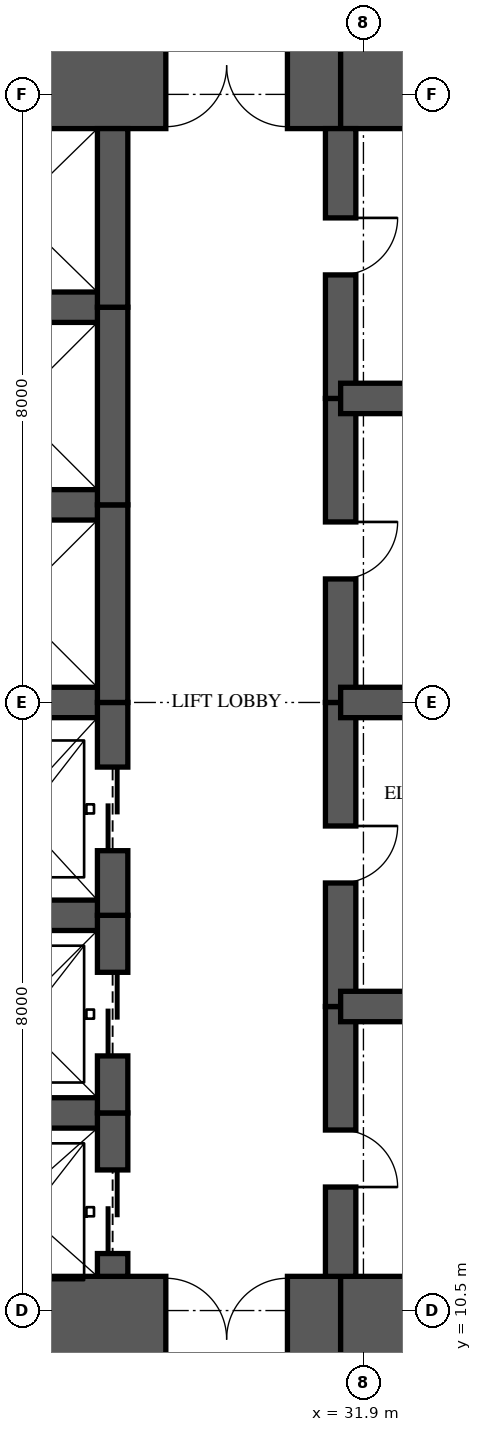
"""IFC4 building model, lengths in metres.
Left out: names, types, materials, properties, quantities, classifications, styles, units other than length and angle.
Written with IfcOpenShell. Run it as: python <this file> out.ifc"""

import sys

from ifc_helpers import new_model, si_unit, direction, frame, frame_2d, origin, place, context, subcontext, project, spatial, rectangle, extrude, element, fill, save


model = new_model("IFC4")
c1 = context("Model", 3, precision=1e-05, world=origin(), true_north=direction((0.0, 1.0)))
c2 = subcontext(c1, "Body", "Model", "MODEL_VIEW")
j1 = project(units=[si_unit("LENGTHUNIT", "METRE"), si_unit("PLANEANGLEUNIT", "RADIAN")], contexts=[c1])
p1 = place(None, origin())
s1 = spatial("IfcSite", under=j1, at=p1, CompositionType="ELEMENT")
p2 = place(p1, origin())
s2 = spatial("IfcBuilding", under=s1, at=p2, CompositionType="ELEMENT")
p3 = place(p2, frame((0.0, 0.0, 24.35)))
s3 = spatial("IfcBuildingStorey", under=s2, at=p3, CompositionType="ELEMENT", Elevation=24.35)
p4 = place(p3, frame((26.0, 10.125, 0.0), z_axis=(0.0, 0.0, 1.0), x_axis=(1.0, 0.0, 0.0)))
e1 = element("IfcWall", 1, at=p4, inside=s3, PredefinedType="SHEAR", context=c2, shape_type="SweptSolid", body=[
    extrude(rectangle(XDim=5.6, YDim=1.65, at=frame_2d((2.8, 0.0))), origin(), (0.0, 0.0, 1.0), 3.35),
])
p5 = place(p4, frame((3.3, 0.0, 0.0)))
e2 = element("IfcOpeningElement", 2, at=p5, cuts=e1, PredefinedType="OPENING", context=c2, shape_type="SweptSolid", body=[
    extrude(rectangle(XDim=1.6, YDim=2.1, at=frame_2d((0.8, 1.05))), frame((0.0, 0.835, 0.0), z_axis=(0.0, -1.0, 0.0), x_axis=(1.0, 0.0, 0.0)), (0.0, 0.0, 1.0), 1.67),
])
for number, where, z_axis, x_axis in (
    (3, (31.6, 10.125, 0.0), (0.0, 0.0, 1.0), (1.0, 0.0, 0.0)),
    (4, (35.9, 26.875, 0.0), (0.0, 0.0, 1.0), (-1.0, 0.0, 0.0)),
):
    element("IfcWall", number, at=place(p3, frame(where, z_axis=z_axis, x_axis=x_axis)), inside=s3, PredefinedType="SHEAR", context=c2, shape_type="SweptSolid", body=[
        extrude(rectangle(XDim=4.3, YDim=1.65, at=frame_2d((2.15, 0.0))), origin(), (0.0, 0.0, 1.0), 3.35),
    ])
p6 = place(p3, frame((31.6, 26.875, 0.0), z_axis=(0.0, 0.0, 1.0), x_axis=(-1.0, 0.0, 0.0)))
e5 = element("IfcWall", 5, at=p6, inside=s3, PredefinedType="SHEAR", context=c2, shape_type="SweptSolid", body=[
    extrude(rectangle(XDim=5.6, YDim=1.65, at=frame_2d((2.8, 0.0))), origin(), (0.0, 0.0, 1.0), 3.35),
])
p7 = place(p6, frame((0.7, 0.0, 0.0)))
e6 = element("IfcOpeningElement", 6, at=p7, cuts=e5, PredefinedType="OPENING", context=c2, shape_type="SweptSolid", body=[
    extrude(rectangle(XDim=1.6, YDim=2.1, at=frame_2d((0.8, 1.05))), frame((0.0, 0.835, 0.0), z_axis=(0.0, -1.0, 0.0), x_axis=(1.0, 0.0, 0.0)), (0.0, 0.0, 1.0), 1.67),
])
p8 = place(p3, frame((28.6, 10.95, 0.0), z_axis=(0.0, 0.0, 1.0), x_axis=(0.0, 1.0, 0.0)))
e7 = element("IfcWall", 7, at=p8, inside=s3, PredefinedType="SHEAR", context=c2, shape_type="SweptSolid", body=[
    extrude(rectangle(XDim=2.15, YDim=0.4, at=frame_2d((1.075, 0.0))), origin(), (0.0, 0.0, 1.0), 3.35),
])
p9 = place(p8, frame((0.3, 0.0, 0.0)))
e8 = element("IfcOpeningElement", 8, at=p9, cuts=e7, PredefinedType="OPENING", context=c2, shape_type="SweptSolid", body=[
    extrude(rectangle(XDim=1.1, YDim=2.1, at=frame_2d((0.55, 1.05))), frame((0.0, 0.21, 0.0), z_axis=(0.0, -1.0, 0.0), x_axis=(1.0, 0.0, 0.0)), (0.0, 0.0, 1.0), 0.42),
])
p10 = place(p3, frame((28.6, 13.1, 0.0), z_axis=(0.0, 0.0, 1.0), x_axis=(0.0, 1.0, 0.0)))
e9 = element("IfcWall", 9, at=p10, inside=s3, PredefinedType="SHEAR", context=c2, shape_type="SweptSolid", body=[
    extrude(rectangle(XDim=2.6, YDim=0.4, at=frame_2d((1.3, 0.0))), origin(), (0.0, 0.0, 1.0), 3.35),
])
p11 = place(p10, frame((0.75, 0.0, 0.0)))
e10 = element("IfcOpeningElement", 10, at=p11, cuts=e9, PredefinedType="OPENING", context=c2, shape_type="SweptSolid", body=[
    extrude(rectangle(XDim=1.1, YDim=2.1, at=frame_2d((0.55, 1.05))), frame((0.0, 0.21, 0.0), z_axis=(0.0, -1.0, 0.0), x_axis=(1.0, 0.0, 0.0)), (0.0, 0.0, 1.0), 0.42),
])
p12 = place(p3, frame((28.6, 15.7, 0.0), z_axis=(0.0, 0.0, 1.0), x_axis=(0.0, 1.0, 0.0)))
e11 = element("IfcWall", 11, at=p12, inside=s3, PredefinedType="SHEAR", context=c2, shape_type="SweptSolid", body=[
    extrude(rectangle(XDim=2.8, YDim=0.4, at=frame_2d((1.4, 0.0))), origin(), (0.0, 0.0, 1.0), 3.35),
])
p13 = place(p12, frame((0.85, 0.0, 0.0)))
e12 = element("IfcOpeningElement", 12, at=p13, cuts=e11, PredefinedType="OPENING", context=c2, shape_type="SweptSolid", body=[
    extrude(rectangle(XDim=1.1, YDim=2.1, at=frame_2d((0.55, 1.05))), frame((0.0, 0.21, 0.0), z_axis=(0.0, -1.0, 0.0), x_axis=(1.0, 0.0, 0.0)), (0.0, 0.0, 1.0), 0.42),
])
p14 = place(p3, frame((28.6, 18.5, 0.0), z_axis=(0.0, 0.0, 1.0), x_axis=(0.0, 1.0, 0.0)))
e13 = element("IfcWall", 13, at=p14, inside=s3, PredefinedType="SHEAR", context=c2, shape_type="SweptSolid", body=[
    extrude(rectangle(XDim=2.6, YDim=0.4, at=frame_2d((1.3, 0.0))), origin(), (0.0, 0.0, 1.0), 3.35),
])
p15 = place(p3, frame((28.6, 21.1, 0.0), z_axis=(0.0, 0.0, 1.0), x_axis=(0.0, 1.0, 0.0)))
e14 = element("IfcWall", 14, at=p15, inside=s3, PredefinedType="SHEAR", context=c2, shape_type="SweptSolid", body=[
    extrude(rectangle(XDim=2.6, YDim=0.4, at=frame_2d((1.3, 0.0))), origin(), (0.0, 0.0, 1.0), 3.35),
])
p16 = place(p3, frame((28.6, 23.7, 0.0), z_axis=(0.0, 0.0, 1.0), x_axis=(0.0, 1.0, 0.0)))
e15 = element("IfcWall", 15, at=p16, inside=s3, PredefinedType="SHEAR", context=c2, shape_type="SweptSolid", body=[
    extrude(rectangle(XDim=2.35, YDim=0.4, at=frame_2d((1.175, 0.0))), origin(), (0.0, 0.0, 1.0), 3.35),
])
p17 = place(p3, frame((31.6, 10.95, 0.0), z_axis=(0.0, 0.0, 1.0), x_axis=(0.0, 1.0, 0.0)))
e16 = element("IfcWall", 16, at=p17, inside=s3, PredefinedType="SHEAR", context=c2, shape_type="SweptSolid", body=[
    extrude(rectangle(XDim=3.55, YDim=0.4, at=frame_2d((1.775, 0.0))), origin(), (0.0, 0.0, 1.0), 3.35),
])
p18 = place(p17, frame((1.175, 0.0, 0.0)))
e17 = element("IfcOpeningElement", 17, at=p18, cuts=e16, PredefinedType="OPENING", context=c2, shape_type="SweptSolid", body=[
    extrude(rectangle(XDim=0.75, YDim=2.1, at=frame_2d((0.375, 1.05))), frame((0.0, 0.21, 0.0), z_axis=(0.0, -1.0, 0.0), x_axis=(1.0, 0.0, 0.0)), (0.0, 0.0, 1.0), 0.42),
])
p19 = place(p3, frame((31.6, 14.5, 0.0), z_axis=(0.0, 0.0, 1.0), x_axis=(0.0, 1.0, 0.0)))
e18 = element("IfcWall", 18, at=p19, inside=s3, PredefinedType="SHEAR", context=c2, shape_type="SweptSolid", body=[
    extrude(rectangle(XDim=4.0, YDim=0.4, at=frame_2d((2.0, 0.0))), origin(), (0.0, 0.0, 1.0), 3.35),
])
p20 = place(p19, frame((1.625, 0.0, 0.0)))
e19 = element("IfcOpeningElement", 19, at=p20, cuts=e18, PredefinedType="OPENING", context=c2, shape_type="SweptSolid", body=[
    extrude(rectangle(XDim=0.75, YDim=2.1, at=frame_2d((0.375, 1.05))), frame((0.0, 0.21, 0.0), z_axis=(0.0, -1.0, 0.0), x_axis=(1.0, 0.0, 0.0)), (0.0, 0.0, 1.0), 0.42),
])
p21 = place(p3, frame((31.6, 18.5, 0.0), z_axis=(0.0, 0.0, 1.0), x_axis=(0.0, 1.0, 0.0)))
e20 = element("IfcWall", 20, at=p21, inside=s3, PredefinedType="SHEAR", context=c2, shape_type="SweptSolid", body=[
    extrude(rectangle(XDim=4.0, YDim=0.4, at=frame_2d((2.0, 0.0))), origin(), (0.0, 0.0, 1.0), 3.35),
])
p22 = place(p21, frame((1.625, 0.0, 0.0)))
e21 = element("IfcOpeningElement", 21, at=p22, cuts=e20, PredefinedType="OPENING", context=c2, shape_type="SweptSolid", body=[
    extrude(rectangle(XDim=0.75, YDim=2.1, at=frame_2d((0.375, 1.05))), frame((0.0, 0.21, 0.0), z_axis=(0.0, -1.0, 0.0), x_axis=(1.0, 0.0, 0.0)), (0.0, 0.0, 1.0), 0.42),
])
p23 = place(p3, frame((31.6, 22.5, 0.0), z_axis=(0.0, 0.0, 1.0), x_axis=(0.0, 1.0, 0.0)))
e22 = element("IfcWall", 22, at=p23, inside=s3, PredefinedType="SHEAR", context=c2, shape_type="SweptSolid", body=[
    extrude(rectangle(XDim=3.55, YDim=0.4, at=frame_2d((1.775, 0.0))), origin(), (0.0, 0.0, 1.0), 3.35),
])
p24 = place(p23, frame((1.625, 0.0, 0.0)))
e23 = element("IfcOpeningElement", 23, at=p24, cuts=e22, PredefinedType="OPENING", context=c2, shape_type="SweptSolid", body=[
    extrude(rectangle(XDim=0.75, YDim=2.1, at=frame_2d((0.375, 1.05))), frame((0.0, 0.21, 0.0), z_axis=(0.0, -1.0, 0.0), x_axis=(1.0, 0.0, 0.0)), (0.0, 0.0, 1.0), 0.42),
])
for number, where, z_axis, x_axis in (
    (24, (26.0, 13.1, 0.0), (0.0, 0.0, 1.0), (1.0, 0.0, 0.0)),
    (25, (26.0, 15.7, 0.0), (0.0, 0.0, 1.0), (1.0, 0.0, 0.0)),
    (26, (26.0, 18.5, 0.0), (0.0, 0.0, 1.0), (1.0, 0.0, 0.0)),
    (27, (26.0, 21.1, 0.0), (0.0, 0.0, 1.0), (1.0, 0.0, 0.0)),
    (28, (26.0, 23.7, 0.0), (0.0, 0.0, 1.0), (1.0, 0.0, 0.0)),
):
    element("IfcWall", number, at=place(p3, frame(where, z_axis=z_axis, x_axis=x_axis)), inside=s3, PredefinedType="SHEAR", context=c2, shape_type="SweptSolid", body=[
        extrude(rectangle(XDim=2.6, YDim=0.4, at=frame_2d((1.3, 0.0))), origin(), (0.0, 0.0, 1.0), 3.35),
    ])
for number, where, z_axis, x_axis in (
    (29, (31.6, 14.5, 0.0), (0.0, 0.0, 1.0), (1.0, 0.0, 0.0)),
    (30, (31.6, 18.5, 0.0), (0.0, 0.0, 1.0), (1.0, 0.0, 0.0)),
    (31, (31.6, 22.5, 0.0), (0.0, 0.0, 1.0), (1.0, 0.0, 0.0)),
):
    element("IfcWall", number, at=place(p3, frame(where, z_axis=z_axis, x_axis=x_axis)), inside=s3, PredefinedType="SHEAR", context=c2, shape_type="SweptSolid", body=[
        extrude(rectangle(XDim=4.3, YDim=0.4, at=frame_2d((2.15, 0.0))), origin(), (0.0, 0.0, 1.0), 3.35),
    ])
p25 = place(p9, origin())
e32 = element("IfcDoor", 32, at=p25, inside=s3, OperationType="SLIDING_TO_LEFT", PredefinedType="DOOR", context=c2, shape_type="SweptSolid", body=[
    extrude(rectangle(XDim=1.1, YDim=2.1, at=frame_2d((0.55, 1.05))), frame((0.0, 0.025, 0.0), z_axis=(0.0, -1.0, 0.0), x_axis=(1.0, 0.0, 0.0)), (0.0, 0.0, 1.0), 0.05),
])
fill(e8, e32)
p26 = place(p11, origin())
e33 = element("IfcDoor", 33, at=p26, inside=s3, OperationType="SLIDING_TO_LEFT", PredefinedType="DOOR", context=c2, shape_type="SweptSolid", body=[
    extrude(rectangle(XDim=1.1, YDim=2.1, at=frame_2d((0.55, 1.05))), frame((0.0, 0.025, 0.0), z_axis=(0.0, -1.0, 0.0), x_axis=(1.0, 0.0, 0.0)), (0.0, 0.0, 1.0), 0.05),
])
fill(e10, e33)
p27 = place(p13, origin())
e34 = element("IfcDoor", 34, at=p27, inside=s3, OperationType="SLIDING_TO_LEFT", PredefinedType="DOOR", context=c2, shape_type="SweptSolid", body=[
    extrude(rectangle(XDim=1.1, YDim=2.1, at=frame_2d((0.55, 1.05))), frame((0.0, 0.025, 0.0), z_axis=(0.0, -1.0, 0.0), x_axis=(1.0, 0.0, 0.0)), (0.0, 0.0, 1.0), 0.05),
])
fill(e12, e34)
p28 = place(p5, origin())
e35 = element("IfcDoor", 35, at=p28, inside=s3, OperationType="DOUBLE_DOOR_SINGLE_SWING", PredefinedType="DOOR", context=c2, shape_type="SweptSolid", body=[
    extrude(rectangle(XDim=1.6, YDim=2.1, at=frame_2d((0.8, 1.05))), frame((0.0, 0.025, 0.0), z_axis=(0.0, -1.0, 0.0), x_axis=(1.0, 0.0, 0.0)), (0.0, 0.0, 1.0), 0.05),
])
fill(e2, e35)
p29 = place(p7, origin())
e36 = element("IfcDoor", 36, at=p29, inside=s3, OperationType="DOUBLE_DOOR_SINGLE_SWING", PredefinedType="DOOR", context=c2, shape_type="SweptSolid", body=[
    extrude(rectangle(XDim=1.6, YDim=2.1, at=frame_2d((0.8, 1.05))), frame((0.0, 0.025, 0.0), z_axis=(0.0, -1.0, 0.0), x_axis=(1.0, 0.0, 0.0)), (0.0, 0.0, 1.0), 0.05),
])
fill(e6, e36)
p30 = place(p18, frame((0.75, 0.0, 0.0), z_axis=(0.0, 0.0, 1.0), x_axis=(-1.0, 0.0, 0.0)))
e37 = element("IfcDoor", 37, at=p30, inside=s3, OperationType="SINGLE_SWING_RIGHT", PredefinedType="DOOR", context=c2, shape_type="SweptSolid", body=[
    extrude(rectangle(XDim=0.75, YDim=2.1, at=frame_2d((0.375, 1.05))), frame((0.0, 0.025, 0.0), z_axis=(0.0, -1.0, 0.0), x_axis=(1.0, 0.0, 0.0)), (0.0, 0.0, 1.0), 0.05),
])
fill(e17, e37)
p31 = place(p20, frame((0.75, 0.0, 0.0), z_axis=(0.0, 0.0, 1.0), x_axis=(-1.0, 0.0, 0.0)))
e38 = element("IfcDoor", 38, at=p31, inside=s3, OperationType="SINGLE_SWING_LEFT", PredefinedType="DOOR", context=c2, shape_type="SweptSolid", body=[
    extrude(rectangle(XDim=0.75, YDim=2.1, at=frame_2d((0.375, 1.05))), frame((0.0, 0.025, 0.0), z_axis=(0.0, -1.0, 0.0), x_axis=(1.0, 0.0, 0.0)), (0.0, 0.0, 1.0), 0.05),
])
fill(e19, e38)
p32 = place(p22, frame((0.75, 0.0, 0.0), z_axis=(0.0, 0.0, 1.0), x_axis=(-1.0, 0.0, 0.0)))
e39 = element("IfcDoor", 39, at=p32, inside=s3, OperationType="SINGLE_SWING_LEFT", PredefinedType="DOOR", context=c2, shape_type="SweptSolid", body=[
    extrude(rectangle(XDim=0.75, YDim=2.1, at=frame_2d((0.375, 1.05))), frame((0.0, 0.025, 0.0), z_axis=(0.0, -1.0, 0.0), x_axis=(1.0, 0.0, 0.0)), (0.0, 0.0, 1.0), 0.05),
])
fill(e21, e39)
p33 = place(p24, frame((0.75, 0.0, 0.0), z_axis=(0.0, 0.0, 1.0), x_axis=(-1.0, 0.0, 0.0)))
e40 = element("IfcDoor", 40, at=p33, inside=s3, OperationType="SINGLE_SWING_LEFT", PredefinedType="DOOR", context=c2, shape_type="SweptSolid", body=[
    extrude(rectangle(XDim=0.75, YDim=2.1, at=frame_2d((0.375, 1.05))), frame((0.0, 0.025, 0.0), z_axis=(0.0, -1.0, 0.0), x_axis=(1.0, 0.0, 0.0)), (0.0, 0.0, 1.0), 0.05),
])
fill(e23, e40)
save(model, sys.argv[1])
